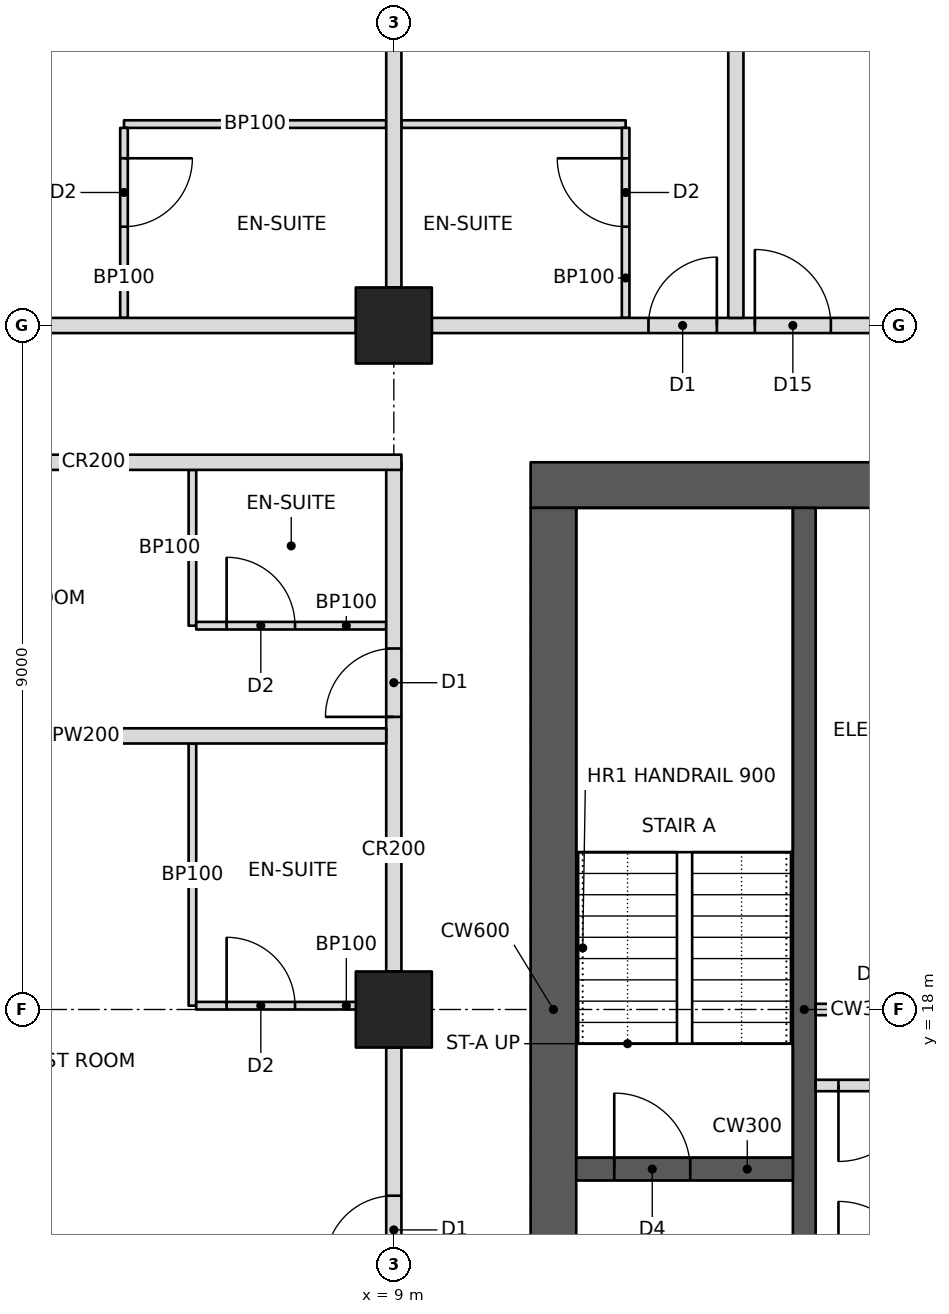
"""IFC4 building model, lengths in metres.
Left out: names, types, materials, properties, quantities, classifications, styles, units other than length and angle.
Written with IfcOpenShell. Run it as: python <this file> out.ifc"""

import sys

from ifc_helpers import new_model, si_unit, direction, frame, frame_2d, origin, origin_2d, place, context, subcontext, project, spatial, rectangle, hollow_rectangle, extrude, element, fill, save


model = new_model("IFC4")
c1 = context("Model", 3, precision=1e-05, world=origin(), true_north=direction((0.0, 1.0)))
c2 = subcontext(c1, "Body", "Model", "MODEL_VIEW")
j1 = project(units=[si_unit("LENGTHUNIT", "METRE"), si_unit("PLANEANGLEUNIT", "RADIAN")], contexts=[c1])
p1 = place(None, origin())
s1 = spatial("IfcSite", under=j1, at=p1, CompositionType="ELEMENT")
p2 = place(p1, origin())
s2 = spatial("IfcBuilding", under=s1, at=p2, CompositionType="ELEMENT")
p3 = place(p2, frame((0.0, 0.0, 85.8)))
s3 = spatial("IfcBuildingStorey", under=s2, at=p3, CompositionType="ELEMENT", Elevation=85.8)
for number, where, z_axis, x_axis in (
    (1, (9.0, 18.0, 0.0), (0.0, 0.0, 1.0), (1.0, 0.0, 0.0)),
    (2, (9.0, 27.0, 0.0), (0.0, 0.0, 1.0), (1.0, 0.0, 0.0)),
):
    element("IfcColumn", number, at=place(p3, frame(where, z_axis=z_axis, x_axis=x_axis)), inside=s3, PredefinedType="COLUMN", context=c2, shape_type="SweptSolid", body=[
        extrude(hollow_rectangle(XDim=1.0, YDim=1.0, WallThickness=0.1, at=origin_2d()), origin(), (0.0, 0.0, 1.0), 3.4),
    ])
p4 = place(p3, frame((10.8, 24.9, 0.0), z_axis=(0.0, 0.0, 1.0), x_axis=(1.0, 0.0, 0.0)))
e3 = element("IfcWall", 3, at=p4, inside=s3, PredefinedType="SHEAR", context=c2, shape_type="SweptSolid", body=[
    extrude(rectangle(XDim=23.4, YDim=0.6, at=frame_2d((11.7, 0.0))), origin(), (0.0, 0.0, 1.0), 3.4),
])
p5 = place(p4, frame((17.2, 0.0, 0.0)))
e4 = element("IfcOpeningElement", 4, at=p5, cuts=e3, PredefinedType="OPENING", context=c2, shape_type="SweptSolid", body=[
    extrude(rectangle(XDim=1.8, YDim=2.1, at=frame_2d((0.9, 1.05))), frame((0.0, 0.31, 0.0), z_axis=(0.0, -1.0, 0.0), x_axis=(1.0, 0.0, 0.0)), (0.0, 0.0, 1.0), 0.62),
])
p6 = place(p4, frame((21.1, 0.0, 0.0)))
e5 = element("IfcOpeningElement", 5, at=p6, cuts=e3, PredefinedType="OPENING", context=c2, shape_type="SweptSolid", body=[
    extrude(rectangle(XDim=1.0, YDim=2.1, at=frame_2d((0.5, 1.05))), frame((0.0, 0.31, 0.0), z_axis=(0.0, -1.0, 0.0), x_axis=(1.0, 0.0, 0.0)), (0.0, 0.0, 1.0), 0.62),
])
p7 = place(p3, frame((11.1, 11.4, 0.0), z_axis=(0.0, 0.0, 1.0), x_axis=(0.0, 1.0, 0.0)))
e6 = element("IfcWall", 6, at=p7, inside=s3, PredefinedType="SHEAR", context=c2, shape_type="SweptSolid", body=[
    extrude(rectangle(XDim=13.2, YDim=0.6, at=frame_2d((6.6, 0.0))), origin(), (0.0, 0.0, 1.0), 3.4),
])
p8 = place(p3, frame((14.4, 11.4, 0.0), z_axis=(0.0, 0.0, 1.0), x_axis=(0.0, 1.0, 0.0)))
e7 = element("IfcWall", 7, at=p8, inside=s3, PredefinedType="SHEAR", context=c2, shape_type="SweptSolid", body=[
    extrude(rectangle(XDim=13.2, YDim=0.3, at=frame_2d((6.6, 0.0))), origin(), (0.0, 0.0, 1.0), 3.4),
])
p9 = place(p3, frame((11.4, 15.9, 0.0), z_axis=(0.0, 0.0, 1.0), x_axis=(1.0, 0.0, 0.0)))
e8 = element("IfcWall", 8, at=p9, inside=s3, PredefinedType="SHEAR", context=c2, shape_type="SweptSolid", body=[
    extrude(rectangle(XDim=2.85, YDim=0.3, at=frame_2d((1.425, 0.0))), origin(), (0.0, 0.0, 1.0), 3.4),
])
p10 = place(p9, frame((0.5, 0.0, 0.0)))
e9 = element("IfcOpeningElement", 9, at=p10, cuts=e8, PredefinedType="OPENING", context=c2, shape_type="SweptSolid", body=[
    extrude(rectangle(XDim=1.0, YDim=2.1, at=frame_2d((0.5, 1.05))), frame((0.0, 0.16, 0.0), z_axis=(0.0, -1.0, 0.0), x_axis=(1.0, 0.0, 0.0)), (0.0, 0.0, 1.0), 0.32),
])
p11 = place(p3, frame((14.55, 18.0, 0.0), z_axis=(0.0, 0.0, 1.0), x_axis=(1.0, 0.0, 0.0)))
e10 = element("IfcWall", 10, at=p11, inside=s3, PredefinedType="PARTITIONING", context=c2, shape_type="SweptSolid", body=[
    extrude(rectangle(XDim=3.3, YDim=0.15, at=frame_2d((1.65, 0.0))), origin(), (0.0, 0.0, 1.0), 3.15),
])
p12 = place(p3, frame((1.0, 27.0, 0.0), z_axis=(0.0, 0.0, 1.0), x_axis=(1.0, 0.0, 0.0)))
e11 = element("IfcWall", 11, at=p12, inside=s3, PredefinedType="PARTITIONING", context=c2, shape_type="SweptSolid", body=[
    extrude(rectangle(XDim=7.5, YDim=0.2, at=frame_2d((3.75, 0.0))), origin(), (0.0, 0.0, 1.0), 2.21),
])
p13 = place(p12, frame((0.25, 0.0, 0.0)))
e12 = element("IfcOpeningElement", 12, at=p13, cuts=e11, PredefinedType="OPENING", context=c2, shape_type="SweptSolid", body=[
    extrude(rectangle(XDim=0.9, YDim=2.1, at=frame_2d((0.45, 1.05))), frame((0.0, 0.11, 0.0), z_axis=(0.0, -1.0, 0.0), x_axis=(1.0, 0.0, 0.0)), (0.0, 0.0, 1.0), 0.22),
])
p14 = place(p3, frame((9.5, 27.0, 0.0), z_axis=(0.0, 0.0, 1.0), x_axis=(1.0, 0.0, 0.0)))
e13 = element("IfcWall", 13, at=p14, inside=s3, PredefinedType="PARTITIONING", context=c2, shape_type="SweptSolid", body=[
    extrude(rectangle(XDim=8.0, YDim=0.2, at=frame_2d((4.0, 0.0))), origin(), (0.0, 0.0, 1.0), 2.21),
])
p15 = place(p14, frame((2.85, 0.0, 0.0)))
e14 = element("IfcOpeningElement", 14, at=p15, cuts=e13, PredefinedType="OPENING", context=c2, shape_type="SweptSolid", body=[
    extrude(rectangle(XDim=0.9, YDim=2.1, at=frame_2d((0.45, 1.05))), frame((0.0, 0.11, 0.0), z_axis=(0.0, -1.0, 0.0), x_axis=(1.0, 0.0, 0.0)), (0.0, 0.0, 1.0), 0.22),
])
p16 = place(p14, frame((4.25, 0.0, 0.0)))
e15 = element("IfcOpeningElement", 15, at=p16, cuts=e13, PredefinedType="OPENING", context=c2, shape_type="SweptSolid", body=[
    extrude(rectangle(XDim=1.0, YDim=2.1, at=frame_2d((0.5, 1.05))), frame((0.0, 0.11, 0.0), z_axis=(0.0, -1.0, 0.0), x_axis=(1.0, 0.0, 0.0)), (0.0, 0.0, 1.0), 0.22),
])
p17 = place(p3, frame((9.0, 10.8, 0.0), z_axis=(0.0, 0.0, 1.0), x_axis=(0.0, 1.0, 0.0)))
e16 = element("IfcWall", 16, at=p17, inside=s3, PredefinedType="PARTITIONING", context=c2, shape_type="SweptSolid", body=[
    extrude(rectangle(XDim=6.7, YDim=0.2, at=frame_2d((3.35, 0.0))), origin(), (0.0, 0.0, 1.0), 2.21),
])
p18 = place(p17, frame((0.25, 0.0, 0.0)))
e17 = element("IfcOpeningElement", 17, at=p18, cuts=e16, PredefinedType="OPENING", context=c2, shape_type="SweptSolid", body=[
    extrude(rectangle(XDim=0.9, YDim=2.1, at=frame_2d((0.45, 1.05))), frame((0.0, 0.11, 0.0), z_axis=(0.0, -1.0, 0.0), x_axis=(1.0, 0.0, 0.0)), (0.0, 0.0, 1.0), 0.22),
])
p19 = place(p17, frame((3.85, 0.0, 0.0)))
e18 = element("IfcOpeningElement", 18, at=p19, cuts=e16, PredefinedType="OPENING", context=c2, shape_type="SweptSolid", body=[
    extrude(rectangle(XDim=0.9, YDim=2.1, at=frame_2d((0.45, 1.05))), frame((0.0, 0.11, 0.0), z_axis=(0.0, -1.0, 0.0), x_axis=(1.0, 0.0, 0.0)), (0.0, 0.0, 1.0), 0.22),
])
p20 = place(p3, frame((9.0, 18.5, 0.0), z_axis=(0.0, 0.0, 1.0), x_axis=(0.0, 1.0, 0.0)))
e19 = element("IfcWall", 19, at=p20, inside=s3, PredefinedType="PARTITIONING", context=c2, shape_type="SweptSolid", body=[
    extrude(rectangle(XDim=6.7, YDim=0.2, at=frame_2d((3.35, 0.0))), origin(), (0.0, 0.0, 1.0), 2.21),
])
p21 = place(p20, frame((3.35, 0.0, 0.0)))
e20 = element("IfcOpeningElement", 20, at=p21, cuts=e19, PredefinedType="OPENING", context=c2, shape_type="SweptSolid", body=[
    extrude(rectangle(XDim=0.9, YDim=2.1, at=frame_2d((0.45, 1.05))), frame((0.0, 0.11, 0.0), z_axis=(0.0, -1.0, 0.0), x_axis=(1.0, 0.0, 0.0)), (0.0, 0.0, 1.0), 0.22),
])
p22 = place(p3, frame((1.0, 25.2, 0.0), z_axis=(0.0, 0.0, 1.0), x_axis=(1.0, 0.0, 0.0)))
e21 = element("IfcWall", 21, at=p22, inside=s3, PredefinedType="PARTITIONING", context=c2, shape_type="SweptSolid", body=[
    extrude(rectangle(XDim=8.1, YDim=0.2, at=frame_2d((4.05, 0.0))), origin(), (0.0, 0.0, 1.0), 2.21),
])
p23 = place(p3, frame((9.0, 27.5, 0.0), z_axis=(0.0, 0.0, 1.0), x_axis=(0.0, 1.0, 0.0)))
e22 = element("IfcWall", 22, at=p23, inside=s3, PredefinedType="PARTITIONING", context=c2, shape_type="SweptSolid", body=[
    extrude(rectangle(XDim=7.5, YDim=0.2, at=frame_2d((3.75, 0.0))), origin(), (0.0, 0.0, 1.0), 2.21),
])
p24 = place(p3, frame((13.5, 27.1, 0.0), z_axis=(0.0, 0.0, 1.0), x_axis=(0.0, 1.0, 0.0)))
e23 = element("IfcWall", 23, at=p24, inside=s3, PredefinedType="PARTITIONING", context=c2, shape_type="SweptSolid", body=[
    extrude(rectangle(XDim=7.9, YDim=0.2, at=frame_2d((3.95, 0.0))), origin(), (0.0, 0.0, 1.0), 2.21),
])
p25 = place(p3, frame((5.45, 29.65, 0.0), z_axis=(0.0, 0.0, 1.0), x_axis=(1.0, 0.0, 0.0)))
e24 = element("IfcWall", 24, at=p25, inside=s3, PredefinedType="PARTITIONING", context=c2, shape_type="SweptSolid", body=[
    extrude(rectangle(XDim=3.45, YDim=0.1, at=frame_2d((1.725, 0.0))), origin(), (0.0, 0.0, 1.0), 2.21),
])
p26 = place(p3, frame((5.45, 27.1, 0.0), z_axis=(0.0, 0.0, 1.0), x_axis=(0.0, 1.0, 0.0)))
e25 = element("IfcWall", 25, at=p26, inside=s3, PredefinedType="PARTITIONING", context=c2, shape_type="SweptSolid", body=[
    extrude(rectangle(XDim=2.5, YDim=0.1, at=frame_2d((1.25, 0.0))), origin(), (0.0, 0.0, 1.0), 2.21),
])
p27 = place(p26, frame((1.2, 0.0, 0.0)))
e26 = element("IfcOpeningElement", 26, at=p27, cuts=e25, PredefinedType="OPENING", context=c2, shape_type="SweptSolid", body=[
    extrude(rectangle(XDim=0.9, YDim=2.1, at=frame_2d((0.45, 1.05))), frame((0.0, 0.06, 0.0), z_axis=(0.0, -1.0, 0.0), x_axis=(1.0, 0.0, 0.0)), (0.0, 0.0, 1.0), 0.12),
])
p28 = place(p3, frame((9.1, 29.65, 0.0), z_axis=(0.0, 0.0, 1.0), x_axis=(1.0, 0.0, 0.0)))
e27 = element("IfcWall", 27, at=p28, inside=s3, PredefinedType="PARTITIONING", context=c2, shape_type="SweptSolid", body=[
    extrude(rectangle(XDim=2.95, YDim=0.1, at=frame_2d((1.475, 0.0))), origin(), (0.0, 0.0, 1.0), 2.21),
])
p29 = place(p3, frame((12.05, 27.1, 0.0), z_axis=(0.0, 0.0, 1.0), x_axis=(0.0, 1.0, 0.0)))
e28 = element("IfcWall", 28, at=p29, inside=s3, PredefinedType="PARTITIONING", context=c2, shape_type="SweptSolid", body=[
    extrude(rectangle(XDim=2.5, YDim=0.1, at=frame_2d((1.25, 0.0))), origin(), (0.0, 0.0, 1.0), 2.21),
])
p30 = place(p29, frame((1.2, 0.0, 0.0)))
e29 = element("IfcOpeningElement", 29, at=p30, cuts=e28, PredefinedType="OPENING", context=c2, shape_type="SweptSolid", body=[
    extrude(rectangle(XDim=0.9, YDim=2.1, at=frame_2d((0.45, 1.05))), frame((0.0, 0.06, 0.0), z_axis=(0.0, -1.0, 0.0), x_axis=(1.0, 0.0, 0.0)), (0.0, 0.0, 1.0), 0.12),
])
p31 = place(p3, frame((8.9, 21.6, 0.0), z_axis=(0.0, 0.0, 1.0), x_axis=(-1.0, 0.0, 0.0)))
e30 = element("IfcWall", 30, at=p31, inside=s3, PredefinedType="PARTITIONING", context=c2, shape_type="SweptSolid", body=[
    extrude(rectangle(XDim=7.9, YDim=0.2, at=frame_2d((3.95, 0.0))), origin(), (0.0, 0.0, 1.0), 2.21),
])
p32 = place(p3, frame((6.35, 18.05, 0.0), z_axis=(0.0, 0.0, 1.0), x_axis=(0.0, 1.0, 0.0)))
e31 = element("IfcWall", 31, at=p32, inside=s3, PredefinedType="PARTITIONING", context=c2, shape_type="SweptSolid", body=[
    extrude(rectangle(XDim=3.45, YDim=0.1, at=frame_2d((1.725, 0.0))), origin(), (0.0, 0.0, 1.0), 2.202),
])
p33 = place(p3, frame((8.9, 18.05, 0.0), z_axis=(0.0, 0.0, 1.0), x_axis=(-1.0, 0.0, 0.0)))
e32 = element("IfcWall", 32, at=p33, inside=s3, PredefinedType="PARTITIONING", context=c2, shape_type="SweptSolid", body=[
    extrude(rectangle(XDim=2.5, YDim=0.1, at=frame_2d((1.25, 0.0))), origin(), (0.0, 0.0, 1.0), 2.203),
])
p34 = place(p33, frame((1.2, 0.0, 0.0)))
e33 = element("IfcOpeningElement", 33, at=p34, cuts=e32, PredefinedType="OPENING", context=c2, shape_type="SweptSolid", body=[
    extrude(rectangle(XDim=0.9, YDim=2.1, at=frame_2d((0.45, 1.05))), frame((0.0, 0.06, 0.0), z_axis=(0.0, -1.0, 0.0), x_axis=(1.0, 0.0, 0.0)), (0.0, 0.0, 1.0), 0.12),
])
p35 = place(p3, frame((6.35, 23.05, 0.0), z_axis=(0.0, 0.0, 1.0), x_axis=(0.0, 1.0, 0.0)))
e34 = element("IfcWall", 34, at=p35, inside=s3, PredefinedType="PARTITIONING", context=c2, shape_type="SweptSolid", body=[
    extrude(rectangle(XDim=2.05, YDim=0.1, at=frame_2d((1.025, 0.0))), origin(), (0.0, 0.0, 1.0), 3.15),
])
p36 = place(p3, frame((8.9, 23.05, 0.0), z_axis=(0.0, 0.0, 1.0), x_axis=(-1.0, 0.0, 0.0)))
e35 = element("IfcWall", 35, at=p36, inside=s3, PredefinedType="PARTITIONING", context=c2, shape_type="SweptSolid", body=[
    extrude(rectangle(XDim=2.5, YDim=0.1, at=frame_2d((1.25, 0.0))), origin(), (0.0, 0.0, 1.0), 2.21),
])
p37 = place(p36, frame((1.2, 0.0, 0.0)))
e36 = element("IfcOpeningElement", 36, at=p37, cuts=e35, PredefinedType="OPENING", context=c2, shape_type="SweptSolid", body=[
    extrude(rectangle(XDim=0.9, YDim=2.1, at=frame_2d((0.45, 1.05))), frame((0.0, 0.06, 0.0), z_axis=(0.0, -1.0, 0.0), x_axis=(1.0, 0.0, 0.0)), (0.0, 0.0, 1.0), 0.12),
])
p38 = place(p3, frame((14.55, 17.0, 0.0), z_axis=(0.0, 0.0, 1.0), x_axis=(1.0, 0.0, 0.0)))
e37 = element("IfcWall", 37, at=p38, inside=s3, PredefinedType="PARTITIONING", context=c2, shape_type="SweptSolid", body=[
    extrude(rectangle(XDim=3.3, YDim=0.15, at=frame_2d((1.65, 0.0))), origin(), (0.0, 0.0, 1.0), 3.15),
])
p39 = place(p38, frame((0.3, 0.0, 0.0)))
e38 = element("IfcOpeningElement", 38, at=p39, cuts=e37, PredefinedType="OPENING", context=c2, shape_type="SweptSolid", body=[
    extrude(rectangle(XDim=1.0, YDim=2.1, at=frame_2d((0.5, 1.05))), frame((0.0, 0.085, 0.0), z_axis=(0.0, -1.0, 0.0), x_axis=(1.0, 0.0, 0.0)), (0.0, 0.0, 1.0), 0.17),
])
p40 = place(p27, frame((0.9, 0.0, 0.0), z_axis=(0.0, 0.0, 1.0), x_axis=(-1.0, 0.0, 0.0)))
e39 = element("IfcDoor", 39, at=p40, inside=s3, OperationType="SINGLE_SWING_LEFT", PredefinedType="DOOR", context=c2, shape_type="SweptSolid", body=[
    extrude(rectangle(XDim=0.9, YDim=2.1, at=frame_2d((0.45, 1.05))), frame((0.0, 0.025, 0.0), z_axis=(0.0, -1.0, 0.0), x_axis=(1.0, 0.0, 0.0)), (0.0, 0.0, 1.0), 0.05),
])
fill(e26, e39)
p41 = place(p30, origin())
e40 = element("IfcDoor", 40, at=p41, inside=s3, OperationType="SINGLE_SWING_RIGHT", PredefinedType="DOOR", context=c2, shape_type="SweptSolid", body=[
    extrude(rectangle(XDim=0.9, YDim=2.1, at=frame_2d((0.45, 1.05))), frame((0.0, 0.025, 0.0), z_axis=(0.0, -1.0, 0.0), x_axis=(1.0, 0.0, 0.0)), (0.0, 0.0, 1.0), 0.05),
])
fill(e29, e40)
p42 = place(p15, origin())
e41 = element("IfcDoor", 41, at=p42, inside=s3, OperationType="SINGLE_SWING_RIGHT", PredefinedType="DOOR", context=c2, shape_type="SweptSolid", body=[
    extrude(rectangle(XDim=0.9, YDim=2.1, at=frame_2d((0.45, 1.05))), frame((0.0, 0.025, 0.0), z_axis=(0.0, -1.0, 0.0), x_axis=(1.0, 0.0, 0.0)), (0.0, 0.0, 1.0), 0.05),
])
fill(e14, e41)
p43 = place(p16, origin())
e42 = element("IfcDoor", 42, at=p43, inside=s3, OperationType="SINGLE_SWING_LEFT", PredefinedType="DOOR", context=c2, shape_type="SweptSolid", body=[
    extrude(rectangle(XDim=1.0, YDim=2.1, at=frame_2d((0.5, 1.05))), frame((0.0, 0.025, 0.0), z_axis=(0.0, -1.0, 0.0), x_axis=(1.0, 0.0, 0.0)), (0.0, 0.0, 1.0), 0.05),
])
fill(e15, e42)
p44 = place(p34, frame((0.9, 0.0, 0.0), z_axis=(0.0, 0.0, 1.0), x_axis=(-1.0, 0.0, 0.0)))
e43 = element("IfcDoor", 43, at=p44, inside=s3, OperationType="SINGLE_SWING_LEFT", PredefinedType="DOOR", context=c2, shape_type="SweptSolid", body=[
    extrude(rectangle(XDim=0.9, YDim=2.1, at=frame_2d((0.45, 1.05))), frame((0.0, 0.025, 0.0), z_axis=(0.0, -1.0, 0.0), x_axis=(1.0, 0.0, 0.0)), (0.0, 0.0, 1.0), 0.05),
])
fill(e33, e43)
p45 = place(p19, origin())
e44 = element("IfcDoor", 44, at=p45, inside=s3, OperationType="SINGLE_SWING_LEFT", PredefinedType="DOOR", context=c2, shape_type="SweptSolid", body=[
    extrude(rectangle(XDim=0.9, YDim=2.1, at=frame_2d((0.45, 1.05))), frame((0.0, 0.025, 0.0), z_axis=(0.0, -1.0, 0.0), x_axis=(1.0, 0.0, 0.0)), (0.0, 0.0, 1.0), 0.05),
])
fill(e18, e44)
p46 = place(p37, frame((0.9, 0.0, 0.0), z_axis=(0.0, 0.0, 1.0), x_axis=(-1.0, 0.0, 0.0)))
e45 = element("IfcDoor", 45, at=p46, inside=s3, OperationType="SINGLE_SWING_LEFT", PredefinedType="DOOR", context=c2, shape_type="SweptSolid", body=[
    extrude(rectangle(XDim=0.9, YDim=2.1, at=frame_2d((0.45, 1.05))), frame((0.0, 0.025, 0.0), z_axis=(0.0, -1.0, 0.0), x_axis=(1.0, 0.0, 0.0)), (0.0, 0.0, 1.0), 0.05),
])
fill(e36, e45)
p47 = place(p21, origin())
e46 = element("IfcDoor", 46, at=p47, inside=s3, OperationType="SINGLE_SWING_LEFT", PredefinedType="DOOR", context=c2, shape_type="SweptSolid", body=[
    extrude(rectangle(XDim=0.9, YDim=2.1, at=frame_2d((0.45, 1.05))), frame((0.0, 0.025, 0.0), z_axis=(0.0, -1.0, 0.0), x_axis=(1.0, 0.0, 0.0)), (0.0, 0.0, 1.0), 0.05),
])
fill(e20, e46)
p48 = place(p39, frame((1.0, 0.0, 0.0), z_axis=(0.0, 0.0, 1.0), x_axis=(-1.0, 0.0, 0.0)))
e47 = element("IfcDoor", 47, at=p48, inside=s3, OperationType="SINGLE_SWING_RIGHT", PredefinedType="DOOR", context=c2, shape_type="SweptSolid", body=[
    extrude(rectangle(XDim=1.0, YDim=2.1, at=frame_2d((0.5, 1.05))), frame((0.0, 0.025, 0.0), z_axis=(0.0, -1.0, 0.0), x_axis=(1.0, 0.0, 0.0)), (0.0, 0.0, 1.0), 0.05),
])
fill(e38, e47)
p49 = place(p10, origin())
e48 = element("IfcDoor", 48, at=p49, inside=s3, OperationType="SINGLE_SWING_LEFT", PredefinedType="DOOR", context=c2, shape_type="SweptSolid", body=[
    extrude(rectangle(XDim=1.0, YDim=2.1, at=frame_2d((0.5, 1.05))), frame((0.0, 0.025, 0.0), z_axis=(0.0, -1.0, 0.0), x_axis=(1.0, 0.0, 0.0)), (0.0, 0.0, 1.0), 0.05),
])
fill(e9, e48)
save(model, sys.argv[1])
